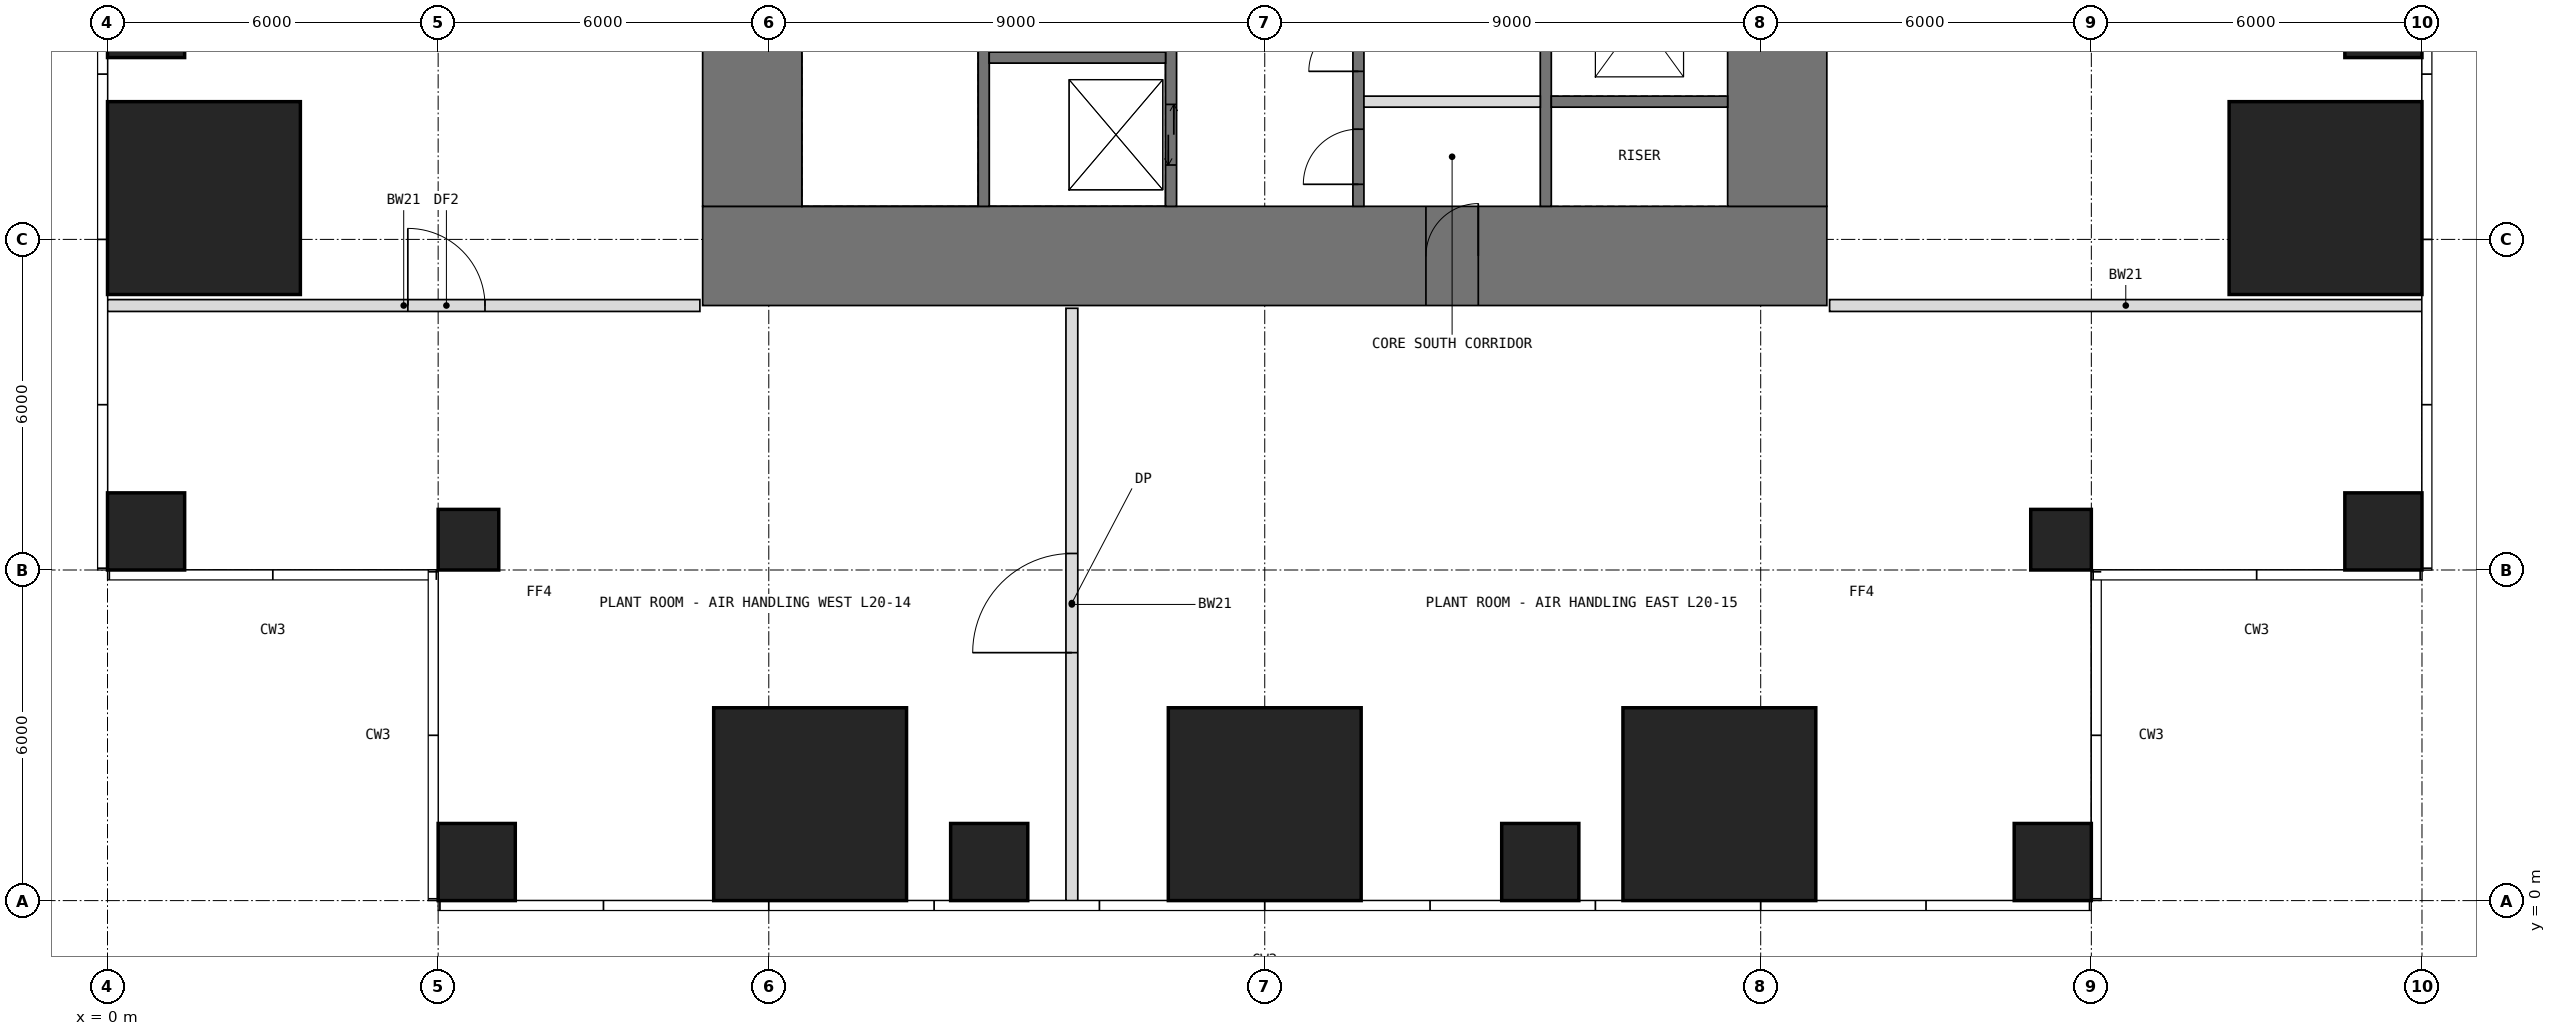
"""IFC4 building model, lengths in metres.
Left out: names, types, materials, properties, quantities, classifications, styles, units other than length and angle.
Written with IfcOpenShell. Run it as: python <this file> out.ifc"""

import sys

from ifc_helpers import new_model, si_unit, direction, frame, frame_2d, origin, origin_2d, place, context, subcontext, project, spatial, rectangle, extrude, element, fill, save


model = new_model("IFC4")
c1 = context("Model", 3, precision=1e-05, world=origin(), true_north=direction((0.0, 1.0)))
c2 = subcontext(c1, "Body", "Model", "MODEL_VIEW")
j1 = project(units=[si_unit("LENGTHUNIT", "METRE"), si_unit("PLANEANGLEUNIT", "RADIAN")], contexts=[c1])
p1 = place(None, origin())
s1 = spatial("IfcSite", under=j1, at=p1, CompositionType="ELEMENT")
p2 = place(p1, origin())
s2 = spatial("IfcBuilding", under=s1, at=p2, CompositionType="ELEMENT")
p3 = place(p2, frame((0.0, 0.0, 86.5)))
s3 = spatial("IfcBuildingStorey", under=s2, at=p3, CompositionType="ELEMENT", Elevation=86.5)
p4 = place(p3, frame((6.7, 0.7, 0.0), z_axis=(0.0, 0.0, 1.0), x_axis=(1.0, 0.0, 0.0)))
e1 = element("IfcColumn", 1, at=p4, inside=s3, PredefinedType="COLUMN", context=c2, shape_type="SweptSolid", body=[
    extrude(rectangle(XDim=1.4, YDim=1.4, at=origin_2d()), origin(), (0.0, 0.0, 1.0), 5.0),
])
p5 = place(p3, frame((12.75, 1.75, 0.0), z_axis=(0.0, 0.0, 1.0), x_axis=(1.0, 0.0, 0.0)))
e2 = element("IfcColumn", 2, at=p5, inside=s3, PredefinedType="COLUMN", context=c2, shape_type="SweptSolid", body=[
    extrude(rectangle(XDim=3.5, YDim=3.5, at=origin_2d()), origin(), (0.0, 0.0, 1.0), 5.0),
])
p6 = place(p3, frame((16.0, 0.7, 0.0), z_axis=(0.0, 0.0, 1.0), x_axis=(1.0, 0.0, 0.0)))
e3 = element("IfcColumn", 3, at=p6, inside=s3, PredefinedType="COLUMN", context=c2, shape_type="SweptSolid", body=[
    extrude(rectangle(XDim=1.4, YDim=1.4, at=origin_2d()), origin(), (0.0, 0.0, 1.0), 5.0),
])
p7 = place(p3, frame((21.0, 1.75, 0.0), z_axis=(0.0, 0.0, 1.0), x_axis=(1.0, 0.0, 0.0)))
e4 = element("IfcColumn", 4, at=p7, inside=s3, PredefinedType="COLUMN", context=c2, shape_type="SweptSolid", body=[
    extrude(rectangle(XDim=3.5, YDim=3.5, at=origin_2d()), origin(), (0.0, 0.0, 1.0), 5.0),
])
p8 = place(p3, frame((26.0, 0.7, 0.0), z_axis=(0.0, 0.0, 1.0), x_axis=(1.0, 0.0, 0.0)))
e5 = element("IfcColumn", 5, at=p8, inside=s3, PredefinedType="COLUMN", context=c2, shape_type="SweptSolid", body=[
    extrude(rectangle(XDim=1.4, YDim=1.4, at=origin_2d()), origin(), (0.0, 0.0, 1.0), 5.0),
])
p9 = place(p3, frame((29.25, 1.75, 0.0), z_axis=(0.0, 0.0, 1.0), x_axis=(1.0, 0.0, 0.0)))
e6 = element("IfcColumn", 6, at=p9, inside=s3, PredefinedType="COLUMN", context=c2, shape_type="SweptSolid", body=[
    extrude(rectangle(XDim=3.5, YDim=3.5, at=origin_2d()), origin(), (0.0, 0.0, 1.0), 5.0),
])
for number, where, z_axis, x_axis in (
    (7, (35.3, 0.7, 0.0), (0.0, 0.0, 1.0), (1.0, 0.0, 0.0)),
    (8, (0.7, 6.7, 0.0), (0.0, 0.0, 1.0), (1.0, 0.0, 0.0)),
):
    element("IfcColumn", number, at=place(p3, frame(where, z_axis=z_axis, x_axis=x_axis)), inside=s3, PredefinedType="COLUMN", context=c2, shape_type="SweptSolid", body=[
        extrude(rectangle(XDim=1.4, YDim=1.4, at=origin_2d()), origin(), (0.0, 0.0, 1.0), 5.0),
    ])
for number, where, z_axis, x_axis in (
    (9, (6.55, 6.55, 0.0), (0.0, 0.0, 1.0), (1.0, 0.0, 0.0)),
    (10, (35.45, 6.55, 0.0), (0.0, 0.0, 1.0), (1.0, 0.0, 0.0)),
):
    element("IfcColumn", number, at=place(p3, frame(where, z_axis=z_axis, x_axis=x_axis)), inside=s3, PredefinedType="COLUMN", context=c2, shape_type="SweptSolid", body=[
        extrude(rectangle(XDim=1.1, YDim=1.1, at=origin_2d()), origin(), (0.0, 0.0, 1.0), 5.0),
    ])
p10 = place(p3, frame((41.3, 6.7, 0.0), z_axis=(0.0, 0.0, 1.0), x_axis=(1.0, 0.0, 0.0)))
e11 = element("IfcColumn", 11, at=p10, inside=s3, PredefinedType="COLUMN", context=c2, shape_type="SweptSolid", body=[
    extrude(rectangle(XDim=1.4, YDim=1.4, at=origin_2d()), origin(), (0.0, 0.0, 1.0), 5.0),
])
for number, where, z_axis, x_axis in (
    (12, (1.75, 12.75, 0.0), (0.0, 0.0, 1.0), (1.0, 0.0, 0.0)),
    (13, (40.25, 12.75, 0.0), (0.0, 0.0, 1.0), (1.0, 0.0, 0.0)),
):
    element("IfcColumn", number, at=place(p3, frame(where, z_axis=z_axis, x_axis=x_axis)), inside=s3, PredefinedType="COLUMN", context=c2, shape_type="SweptSolid", body=[
        extrude(rectangle(XDim=3.5, YDim=3.5, at=origin_2d()), origin(), (0.0, 0.0, 1.0), 5.0),
    ])
for number, where, z_axis, x_axis in (
    (14, (0.7, 16.0, 0.0), (0.0, 0.0, 1.0), (1.0, 0.0, 0.0)),
    (15, (41.3, 16.0, 0.0), (0.0, 0.0, 1.0), (1.0, 0.0, 0.0)),
):
    element("IfcColumn", number, at=place(p3, frame(where, z_axis=z_axis, x_axis=x_axis)), inside=s3, PredefinedType="COLUMN", context=c2, shape_type="SweptSolid", body=[
        extrude(rectangle(XDim=1.4, YDim=1.4, at=origin_2d()), origin(), (0.0, 0.0, 1.0), 5.0),
    ])
p11 = place(p3, frame((10.8, 11.7, -0.25), z_axis=(0.0, 0.0, 1.0), x_axis=(1.0, 0.0, 0.0)))
e16 = element("IfcWall", 16, at=p11, inside=s3, PredefinedType="SHEAR", context=c2, shape_type="SweptSolid", body=[
    extrude(rectangle(XDim=20.4, YDim=1.8, at=frame_2d((10.2, 0.0))), origin(), (0.0, 0.0, 1.0), 5.2),
])
p12 = place(p11, frame((13.125, 0.0, 0.25)))
e17 = element("IfcOpeningElement", 17, at=p12, cuts=e16, PredefinedType="OPENING", context=c2, shape_type="SweptSolid", body=[
    extrude(rectangle(XDim=0.95, YDim=2.4, at=frame_2d((0.475, 1.2))), frame((0.0, 0.91, 0.0), z_axis=(0.0, -1.0, 0.0), x_axis=(1.0, 0.0, 0.0)), (0.0, 0.0, 1.0), 1.82),
])
p13 = place(p3, frame((11.7, 12.6, -0.25), z_axis=(0.0, 0.0, 1.0), x_axis=(0.0, 1.0, 0.0)))
e18 = element("IfcWall", 18, at=p13, inside=s3, PredefinedType="SHEAR", context=c2, shape_type="SweptSolid", body=[
    extrude(rectangle(XDim=16.8, YDim=1.8, at=frame_2d((8.4, 0.0))), origin(), (0.0, 0.0, 1.0), 5.2),
])
p14 = place(p13, frame((10.6, 0.0, 0.25)))
e19 = element("IfcOpeningElement", 19, at=p14, cuts=e18, PredefinedType="OPENING", context=c2, shape_type="SweptSolid", body=[
    extrude(rectangle(XDim=1.0, YDim=2.2, at=frame_2d((0.5, 1.1))), frame((0.0, 0.91, 0.0), z_axis=(0.0, -1.0, 0.0), x_axis=(1.0, 0.0, 0.0)), (0.0, 0.0, 1.0), 1.82),
])
p15 = place(p3, frame((30.3, 12.6, -0.25), z_axis=(0.0, 0.0, 1.0), x_axis=(0.0, 1.0, 0.0)))
e20 = element("IfcWall", 20, at=p15, inside=s3, PredefinedType="SHEAR", context=c2, shape_type="SweptSolid", body=[
    extrude(rectangle(XDim=16.8, YDim=1.8, at=frame_2d((8.4, 0.0))), origin(), (0.0, 0.0, 1.0), 5.2),
])
p16 = place(p15, frame((5.2, 0.0, 0.25)))
e21 = element("IfcOpeningElement", 21, at=p16, cuts=e20, PredefinedType="OPENING", context=c2, shape_type="SweptSolid", body=[
    extrude(rectangle(XDim=1.0, YDim=2.2, at=frame_2d((0.5, 1.1))), frame((0.0, 0.91, 0.0), z_axis=(0.0, -1.0, 0.0), x_axis=(1.0, 0.0, 0.0)), (0.0, 0.0, 1.0), 1.82),
])
p17 = place(p3, frame((15.9, 12.6, -0.25), z_axis=(0.0, 0.0, 1.0), x_axis=(0.0, 1.0, 0.0)))
e22 = element("IfcWall", 22, at=p17, inside=s3, PredefinedType="SHEAR", context=c2, shape_type="SweptSolid", body=[
    extrude(rectangle(XDim=16.8, YDim=0.2, at=frame_2d((8.4, 0.0))), origin(), (0.0, 0.0, 1.0), 5.2),
])
p18 = place(p17, frame((8.9, 0.0, 0.25)))
e23 = element("IfcOpeningElement", 23, at=p18, cuts=e22, PredefinedType="OPENING", context=c2, shape_type="SweptSolid", body=[
    extrude(rectangle(XDim=1.0, YDim=2.2, at=frame_2d((0.5, 1.1))), frame((0.0, 0.11, 0.0), z_axis=(0.0, -1.0, 0.0), x_axis=(1.0, 0.0, 0.0)), (0.0, 0.0, 1.0), 0.22),
])
p19 = place(p3, frame((19.3, 12.6, -0.25), z_axis=(0.0, 0.0, 1.0), x_axis=(0.0, 1.0, 0.0)))
e24 = element("IfcWall", 24, at=p19, inside=s3, PredefinedType="SHEAR", context=c2, shape_type="SweptSolid", body=[
    extrude(rectangle(XDim=16.8, YDim=0.2, at=frame_2d((8.4, 0.0))), origin(), (0.0, 0.0, 1.0), 5.2),
])
p20 = place(p19, frame((8.7, 0.0, 0.25)))
e25 = element("IfcOpeningElement", 25, at=p20, cuts=e24, PredefinedType="OPENING", context=c2, shape_type="SweptSolid", body=[
    extrude(rectangle(XDim=1.0, YDim=2.2, at=frame_2d((0.5, 1.1))), frame((0.0, 0.11, 0.0), z_axis=(0.0, -1.0, 0.0), x_axis=(1.0, 0.0, 0.0)), (0.0, 0.0, 1.0), 0.22),
])
p21 = place(p19, frame((10.85, 0.0, 0.25)))
e26 = element("IfcOpeningElement", 26, at=p21, cuts=e24, PredefinedType="OPENING", context=c2, shape_type="SweptSolid", body=[
    extrude(rectangle(XDim=0.9, YDim=2.2, at=frame_2d((0.45, 1.1))), frame((0.0, 0.11, 0.0), z_axis=(0.0, -1.0, 0.0), x_axis=(1.0, 0.0, 0.0)), (0.0, 0.0, 1.0), 0.22),
])
p22 = place(p19, frame((13.3, 0.0, 0.25)))
e27 = element("IfcOpeningElement", 27, at=p22, cuts=e24, PredefinedType="OPENING", context=c2, shape_type="SweptSolid", body=[
    extrude(rectangle(XDim=1.0, YDim=2.2, at=frame_2d((0.5, 1.1))), frame((0.0, 0.11, 0.0), z_axis=(0.0, -1.0, 0.0), x_axis=(1.0, 0.0, 0.0)), (0.0, 0.0, 1.0), 0.22),
])
p23 = place(p19, frame((15.5, 0.0, 0.25)))
e28 = element("IfcOpeningElement", 28, at=p23, cuts=e24, PredefinedType="OPENING", context=c2, shape_type="SweptSolid", body=[
    extrude(rectangle(XDim=1.0, YDim=2.2, at=frame_2d((0.5, 1.1))), frame((0.0, 0.11, 0.0), z_axis=(0.0, -1.0, 0.0), x_axis=(1.0, 0.0, 0.0)), (0.0, 0.0, 1.0), 0.22),
])
p24 = place(p19, frame((0.75, 0.0, 0.25)))
e29 = element("IfcOpeningElement", 29, at=p24, cuts=e24, PredefinedType="OPENING", context=c2, shape_type="SweptSolid", body=[
    extrude(rectangle(XDim=1.1, YDim=2.2, at=frame_2d((0.55, 1.1))), frame((0.0, 0.11, 0.0), z_axis=(0.0, -1.0, 0.0), x_axis=(1.0, 0.0, 0.0)), (0.0, 0.0, 1.0), 0.22),
])
p25 = place(p19, frame((3.55, 0.0, 0.25)))
e30 = element("IfcOpeningElement", 30, at=p25, cuts=e24, PredefinedType="OPENING", context=c2, shape_type="SweptSolid", body=[
    extrude(rectangle(XDim=1.1, YDim=2.2, at=frame_2d((0.55, 1.1))), frame((0.0, 0.11, 0.0), z_axis=(0.0, -1.0, 0.0), x_axis=(1.0, 0.0, 0.0)), (0.0, 0.0, 1.0), 0.22),
])
p26 = place(p19, frame((6.35, 0.0, 0.25)))
e31 = element("IfcOpeningElement", 31, at=p26, cuts=e24, PredefinedType="OPENING", context=c2, shape_type="SweptSolid", body=[
    extrude(rectangle(XDim=1.1, YDim=2.2, at=frame_2d((0.55, 1.1))), frame((0.0, 0.11, 0.0), z_axis=(0.0, -1.0, 0.0), x_axis=(1.0, 0.0, 0.0)), (0.0, 0.0, 1.0), 0.22),
])
p27 = place(p3, frame((22.7, 12.6, -0.25), z_axis=(0.0, 0.0, 1.0), x_axis=(0.0, 1.0, 0.0)))
e32 = element("IfcWall", 32, at=p27, inside=s3, PredefinedType="SHEAR", context=c2, shape_type="SweptSolid", body=[
    extrude(rectangle(XDim=16.8, YDim=0.2, at=frame_2d((8.4, 0.0))), origin(), (0.0, 0.0, 1.0), 5.2),
])
p28 = place(p27, frame((0.4, 0.0, 0.25)))
e33 = element("IfcOpeningElement", 33, at=p28, cuts=e32, PredefinedType="OPENING", context=c2, shape_type="SweptSolid", body=[
    extrude(rectangle(XDim=1.0, YDim=2.2, at=frame_2d((0.5, 1.1))), frame((0.0, 0.11, 0.0), z_axis=(0.0, -1.0, 0.0), x_axis=(1.0, 0.0, 0.0)), (0.0, 0.0, 1.0), 0.22),
])
p29 = place(p27, frame((7.1, 0.0, 0.25)))
e34 = element("IfcOpeningElement", 34, at=p29, cuts=e32, PredefinedType="OPENING", context=c2, shape_type="SweptSolid", body=[
    extrude(rectangle(XDim=1.0, YDim=2.2, at=frame_2d((0.5, 1.1))), frame((0.0, 0.11, 0.0), z_axis=(0.0, -1.0, 0.0), x_axis=(1.0, 0.0, 0.0)), (0.0, 0.0, 1.0), 0.22),
])
p30 = place(p27, frame((2.45, 0.0, 0.25)))
e35 = element("IfcOpeningElement", 35, at=p30, cuts=e32, PredefinedType="OPENING", context=c2, shape_type="SweptSolid", body=[
    extrude(rectangle(XDim=0.9, YDim=2.2, at=frame_2d((0.45, 1.1))), frame((0.0, 0.11, 0.0), z_axis=(0.0, -1.0, 0.0), x_axis=(1.0, 0.0, 0.0)), (0.0, 0.0, 1.0), 0.22),
])
p31 = place(p27, frame((4.95, 0.0, 0.25)))
e36 = element("IfcOpeningElement", 36, at=p31, cuts=e32, PredefinedType="OPENING", context=c2, shape_type="SweptSolid", body=[
    extrude(rectangle(XDim=0.9, YDim=2.2, at=frame_2d((0.45, 1.1))), frame((0.0, 0.11, 0.0), z_axis=(0.0, -1.0, 0.0), x_axis=(1.0, 0.0, 0.0)), (0.0, 0.0, 1.0), 0.22),
])
p32 = place(p3, frame((26.1, 12.6, -0.25), z_axis=(0.0, 0.0, 1.0), x_axis=(0.0, 1.0, 0.0)))
e37 = element("IfcWall", 37, at=p32, inside=s3, PredefinedType="SHEAR", context=c2, shape_type="SweptSolid", body=[
    extrude(rectangle(XDim=16.8, YDim=0.2, at=frame_2d((8.4, 0.0))), origin(), (0.0, 0.0, 1.0), 5.2),
])
p33 = place(p32, frame((6.9, 0.0, 0.25)))
e38 = element("IfcOpeningElement", 38, at=p33, cuts=e37, PredefinedType="OPENING", context=c2, shape_type="SweptSolid", body=[
    extrude(rectangle(XDim=1.0, YDim=2.2, at=frame_2d((0.5, 1.1))), frame((0.0, 0.11, 0.0), z_axis=(0.0, -1.0, 0.0), x_axis=(1.0, 0.0, 0.0)), (0.0, 0.0, 1.0), 0.22),
])
for number, where, z_axis, x_axis in (
    (39, (16.0, 15.3, -0.25), (0.0, 0.0, 1.0), (1.0, 0.0, 0.0)),
    (40, (26.2, 14.5, -0.25), (0.0, 0.0, 1.0), (1.0, 0.0, 0.0)),
):
    element("IfcWall", number, at=place(p3, frame(where, z_axis=z_axis, x_axis=x_axis)), inside=s3, PredefinedType="SHEAR", context=c2, shape_type="SweptSolid", body=[
        extrude(rectangle(XDim=3.2, YDim=0.2, at=frame_2d((1.6, 0.0))), origin(), (0.0, 0.0, 1.0), 5.2),
    ])
p34 = place(p3, frame((22.8, 14.5, 0.0), z_axis=(0.0, 0.0, 1.0), x_axis=(1.0, 0.0, 0.0)))
e41 = element("IfcWall", 41, at=p34, inside=s3, PredefinedType="PARTITIONING", context=c2, shape_type="SweptSolid", body=[
    extrude(rectangle(XDim=3.2, YDim=0.2, at=frame_2d((1.6, 0.0))), origin(), (0.0, 0.0, 1.0), 4.75),
])
p35 = place(p3, frame((0.0, 10.8, 0.0), z_axis=(0.0, 0.0, 1.0), x_axis=(1.0, 0.0, 0.0)))
e42 = element("IfcWall", 42, at=p35, inside=s3, PredefinedType="PARTITIONING", context=c2, shape_type="SweptSolid", body=[
    extrude(rectangle(XDim=10.75, YDim=0.215, at=frame_2d((5.375, 0.0))), origin(), (0.0, 0.0, 1.0), 4.75),
])
p36 = place(p35, frame((5.45, 0.0, 0.0)))
e43 = element("IfcOpeningElement", 43, at=p36, cuts=e42, PredefinedType="OPENING", context=c2, shape_type="SweptSolid", body=[
    extrude(rectangle(XDim=1.4, YDim=2.2, at=frame_2d((0.7, 1.1))), frame((0.0, 0.118, 0.0), z_axis=(0.0, -1.0, 0.0), x_axis=(1.0, 0.0, 0.0)), (0.0, 0.0, 1.0), 0.235),
])
p37 = place(p3, frame((17.5, 0.0, 0.0), z_axis=(0.0, 0.0, 1.0), x_axis=(0.0, 1.0, 0.0)))
e44 = element("IfcWall", 44, at=p37, inside=s3, PredefinedType="PARTITIONING", context=c2, shape_type="SweptSolid", body=[
    extrude(rectangle(XDim=10.75, YDim=0.215, at=frame_2d((5.375, 0.0))), origin(), (0.0, 0.0, 1.0), 4.75),
])
p38 = place(p37, frame((4.5, 0.0, 0.0)))
e45 = element("IfcOpeningElement", 45, at=p38, cuts=e44, PredefinedType="OPENING", context=c2, shape_type="SweptSolid", body=[
    extrude(rectangle(XDim=1.8, YDim=2.4, at=frame_2d((0.9, 1.2))), frame((0.0, 0.118, 0.0), z_axis=(0.0, -1.0, 0.0), x_axis=(1.0, 0.0, 0.0)), (0.0, 0.0, 1.0), 0.235),
])
p39 = place(p3, frame((31.25, 10.8, 0.0), z_axis=(0.0, 0.0, 1.0), x_axis=(1.0, 0.0, 0.0)))
e46 = element("IfcWall", 46, at=p39, inside=s3, PredefinedType="PARTITIONING", context=c2, shape_type="SweptSolid", body=[
    extrude(rectangle(XDim=10.75, YDim=0.215, at=frame_2d((5.375, 0.0))), origin(), (0.0, 0.0, 1.0), 4.75),
])
p40 = place(p28, origin())
e47 = element("IfcDoor", 47, at=p40, inside=s3, OperationType="SINGLE_SWING_LEFT", PredefinedType="DOOR", context=c2, shape_type="SweptSolid", body=[
    extrude(rectangle(XDim=1.0, YDim=2.2, at=frame_2d((0.5, 1.1))), frame((0.0, 0.025, 0.0), z_axis=(0.0, -1.0, 0.0), x_axis=(1.0, 0.0, 0.0)), (0.0, 0.0, 1.0), 0.05),
])
fill(e33, e47)
p41 = place(p12, origin())
e48 = element("IfcDoor", 48, at=p41, inside=s3, OperationType="SINGLE_SWING_RIGHT", PredefinedType="DOOR", context=c2, shape_type="SweptSolid", body=[
    extrude(rectangle(XDim=0.95, YDim=2.4, at=frame_2d((0.475, 1.2))), frame((0.0, 0.025, 0.0), z_axis=(0.0, -1.0, 0.0), x_axis=(1.0, 0.0, 0.0)), (0.0, 0.0, 1.0), 0.05),
])
fill(e17, e48)
p42 = place(p30, origin())
e49 = element("IfcDoor", 49, at=p42, inside=s3, OperationType="SINGLE_SWING_LEFT", PredefinedType="DOOR", context=c2, shape_type="SweptSolid", body=[
    extrude(rectangle(XDim=0.9, YDim=2.2, at=frame_2d((0.45, 1.1))), frame((0.0, 0.025, 0.0), z_axis=(0.0, -1.0, 0.0), x_axis=(1.0, 0.0, 0.0)), (0.0, 0.0, 1.0), 0.05),
])
fill(e35, e49)
p43 = place(p38, origin())
e50 = element("IfcDoor", 50, at=p43, inside=s3, OperationType="DOUBLE_DOOR_SINGLE_SWING", PredefinedType="DOOR", context=c2, shape_type="SweptSolid", body=[
    extrude(rectangle(XDim=1.8, YDim=2.4, at=frame_2d((0.9, 1.2))), frame((0.0, 0.025, 0.0), z_axis=(0.0, -1.0, 0.0), x_axis=(1.0, 0.0, 0.0)), (0.0, 0.0, 1.0), 0.05),
])
fill(e45, e50)
p44 = place(p36, origin())
e51 = element("IfcDoor", 51, at=p44, inside=s3, OperationType="SINGLE_SWING_LEFT", PredefinedType="DOOR", context=c2, shape_type="SweptSolid", body=[
    extrude(rectangle(XDim=1.4, YDim=2.2, at=frame_2d((0.7, 1.1))), frame((0.0, 0.025, 0.0), z_axis=(0.0, -1.0, 0.0), x_axis=(1.0, 0.0, 0.0)), (0.0, 0.0, 1.0), 0.05),
])
fill(e43, e51)
p45 = place(p24, origin())
e52 = element("IfcDoor", 52, at=p45, inside=s3, OperationType="DOUBLE_DOOR_SLIDING", PredefinedType="DOOR", context=c2, shape_type="SweptSolid", body=[
    extrude(rectangle(XDim=1.1, YDim=2.2, at=frame_2d((0.55, 1.1))), frame((0.0, 0.025, 0.0), z_axis=(0.0, -1.0, 0.0), x_axis=(1.0, 0.0, 0.0)), (0.0, 0.0, 1.0), 0.05),
])
fill(e29, e52)
save(model, sys.argv[1])
